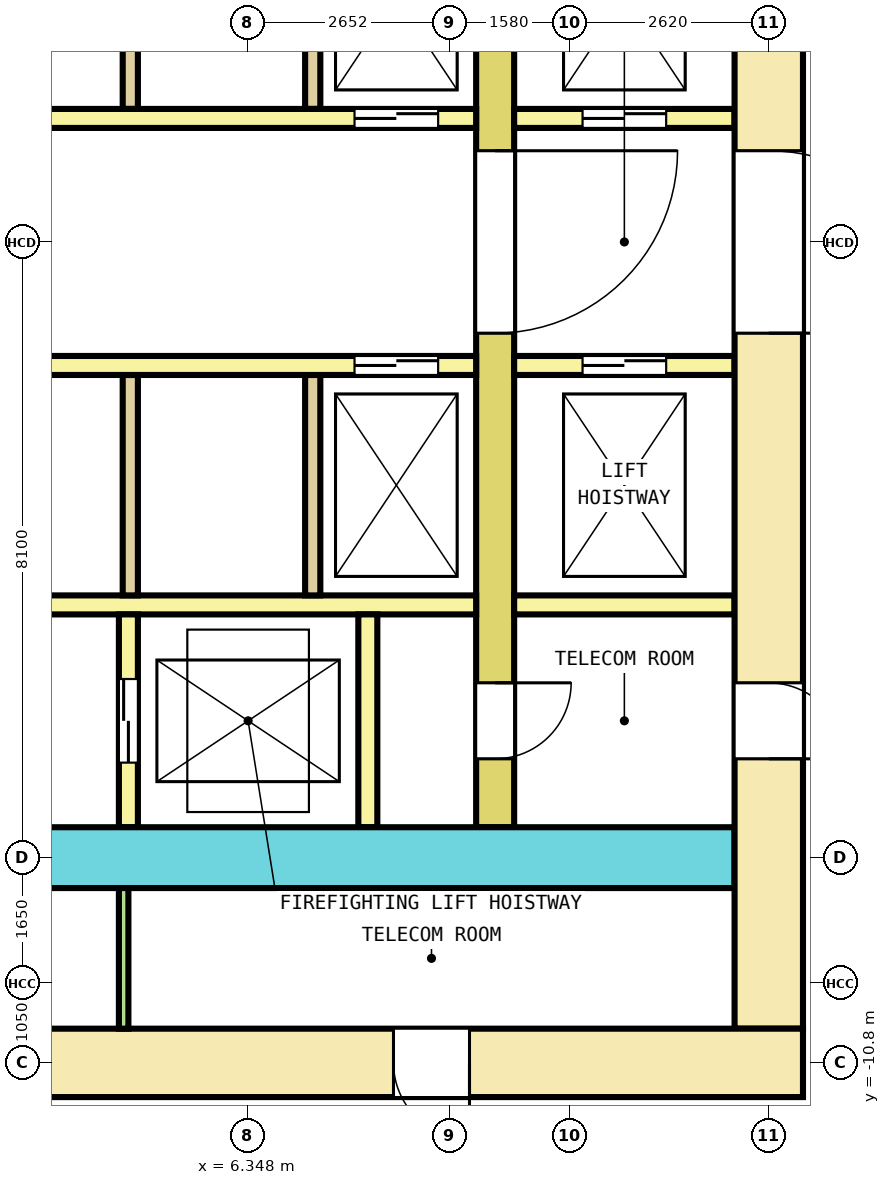
"""IFC4 building model, lengths in metres.
Left out: names, types, materials, properties, quantities, classifications, styles, units other than length and angle.
Written with IfcOpenShell. Run it as: python <this file> out.ifc"""

import sys

from ifc_helpers import new_model, si_unit, direction, frame, frame_2d, origin, place, context, subcontext, project, spatial, rectangle, extrude, element, fill, save


model = new_model("IFC4")
c1 = context("Model", 3, precision=1e-05, world=origin(), true_north=direction((0.0, 1.0)))
c2 = subcontext(c1, "Body", "Model", "MODEL_VIEW")
j1 = project(units=[si_unit("LENGTHUNIT", "METRE"), si_unit("PLANEANGLEUNIT", "RADIAN")], contexts=[c1])
p1 = place(None, origin())
s1 = spatial("IfcSite", under=j1, at=p1, CompositionType="ELEMENT")
p2 = place(p1, origin())
s2 = spatial("IfcBuilding", under=s1, at=p2, CompositionType="ELEMENT")
p3 = place(p2, frame((0.0, 0.0, 49.8)))
s3 = spatial("IfcBuildingStorey", under=s2, at=p3, CompositionType="ELEMENT", Elevation=49.8)
p4 = place(p3, frame((-13.65, -10.8, 0.0), z_axis=(0.0, 0.0, 1.0), x_axis=(1.0, 0.0, 0.0)))
e1 = element("IfcWall", 1, at=p4, inside=s3, PredefinedType="SHEAR", context=c2, shape_type="SweptSolid", body=[
    extrude(rectangle(XDim=27.3, YDim=0.9, at=frame_2d((13.65, 0.0))), origin(), (0.0, 0.0, 1.0), 4.1),
])
p5 = place(p4, frame((1.911, 0.0, 0.0)))
e2 = element("IfcOpeningElement", 2, at=p5, cuts=e1, PredefinedType="OPENING", context=c2, shape_type="SweptSolid", body=[
    extrude(rectangle(XDim=1.0, YDim=2.1, at=frame_2d((0.5, 1.05))), frame((0.0, 0.46, 0.0), z_axis=(0.0, -1.0, 0.0), x_axis=(1.0, 0.0, 0.0)), (0.0, 0.0, 1.0), 0.92),
])
p6 = place(p4, frame((5.027, 0.0, 0.0)))
e3 = element("IfcOpeningElement", 3, at=p6, cuts=e1, PredefinedType="OPENING", context=c2, shape_type="SweptSolid", body=[
    extrude(rectangle(XDim=1.0, YDim=2.1, at=frame_2d((0.5, 1.05))), frame((0.0, 0.46, 0.0), z_axis=(0.0, -1.0, 0.0), x_axis=(1.0, 0.0, 0.0)), (0.0, 0.0, 1.0), 0.92),
])
p7 = place(p4, frame((8.111, 0.0, 0.0)))
e4 = element("IfcOpeningElement", 4, at=p7, cuts=e1, PredefinedType="OPENING", context=c2, shape_type="SweptSolid", body=[
    extrude(rectangle(XDim=1.0, YDim=2.1, at=frame_2d((0.5, 1.05))), frame((0.0, 0.46, 0.0), z_axis=(0.0, -1.0, 0.0), x_axis=(1.0, 0.0, 0.0)), (0.0, 0.0, 1.0), 0.92),
])
p8 = place(p4, frame((11.195, 0.0, 0.0)))
e5 = element("IfcOpeningElement", 5, at=p8, cuts=e1, PredefinedType="OPENING", context=c2, shape_type="SweptSolid", body=[
    extrude(rectangle(XDim=1.0, YDim=2.1, at=frame_2d((0.5, 1.05))), frame((0.0, 0.46, 0.0), z_axis=(0.0, -1.0, 0.0), x_axis=(1.0, 0.0, 0.0)), (0.0, 0.0, 1.0), 0.92),
])
p9 = place(p4, frame((21.913, 0.0, 0.0)))
e6 = element("IfcOpeningElement", 6, at=p9, cuts=e1, PredefinedType="OPENING", context=c2, shape_type="SweptSolid", body=[
    extrude(rectangle(XDim=1.0, YDim=2.1, at=frame_2d((0.5, 1.05))), frame((0.0, 0.46, 0.0), z_axis=(0.0, -1.0, 0.0), x_axis=(1.0, 0.0, 0.0)), (0.0, 0.0, 1.0), 0.92),
])
p10 = place(p4, frame((15.2, 0.0, 0.0)))
e7 = element("IfcOpeningElement", 7, at=p10, cuts=e1, PredefinedType="OPENING", context=c2, shape_type="SweptSolid", body=[
    extrude(rectangle(XDim=1.2, YDim=2.1, at=frame_2d((0.6, 1.05))), frame((0.0, 0.46, 0.0), z_axis=(0.0, -1.0, 0.0), x_axis=(1.0, 0.0, 0.0)), (0.0, 0.0, 1.0), 0.92),
])
p11 = place(p3, frame((13.2, -10.35, 0.0), z_axis=(0.0, 0.0, 1.0), x_axis=(0.0, 1.0, 0.0)))
e8 = element("IfcWall", 8, at=p11, inside=s3, PredefinedType="SHEAR", context=c2, shape_type="SweptSolid", body=[
    extrude(rectangle(XDim=20.7, YDim=0.9, at=frame_2d((10.35, 0.0))), origin(), (0.0, 0.0, 1.0), 4.1),
])
p12 = place(p11, frame((9.15, 0.0, 0.0)))
e9 = element("IfcOpeningElement", 9, at=p12, cuts=e8, PredefinedType="OPENING", context=c2, shape_type="SweptSolid", body=[
    extrude(rectangle(XDim=2.4, YDim=2.1, at=frame_2d((1.2, 1.05))), frame((0.0, 0.46, 0.0), z_axis=(0.0, -1.0, 0.0), x_axis=(1.0, 0.0, 0.0)), (0.0, 0.0, 1.0), 0.92),
])
p13 = place(p11, frame((16.05, 0.0, 0.0)))
e10 = element("IfcOpeningElement", 10, at=p13, cuts=e8, PredefinedType="OPENING", context=c2, shape_type="SweptSolid", body=[
    extrude(rectangle(XDim=1.2, YDim=2.1, at=frame_2d((0.6, 1.05))), frame((0.0, 0.46, 0.0), z_axis=(0.0, -1.0, 0.0), x_axis=(1.0, 0.0, 0.0)), (0.0, 0.0, 1.0), 0.92),
])
p14 = place(p11, frame((3.55, 0.0, 0.0)))
e11 = element("IfcOpeningElement", 11, at=p14, cuts=e8, PredefinedType="OPENING", context=c2, shape_type="SweptSolid", body=[
    extrude(rectangle(XDim=1.0, YDim=2.1, at=frame_2d((0.5, 1.05))), frame((0.0, 0.46, 0.0), z_axis=(0.0, -1.0, 0.0), x_axis=(1.0, 0.0, 0.0)), (0.0, 0.0, 1.0), 0.92),
])
p15 = place(p3, frame((-12.75, -8.1, 0.0), z_axis=(0.0, 0.0, 1.0), x_axis=(1.0, 0.0, 0.0)))
e12 = element("IfcWall", 12, at=p15, inside=s3, PredefinedType="SHEAR", context=c2, shape_type="SweptSolid", body=[
    extrude(rectangle(XDim=25.5, YDim=0.8, at=frame_2d((12.75, 0.0))), origin(), (0.0, 0.0, 1.0), 4.1),
])
p16 = place(p15, frame((14.3, 0.0, 0.0)))
e13 = element("IfcOpeningElement", 13, at=p16, cuts=e12, PredefinedType="OPENING", context=c2, shape_type="SweptSolid", body=[
    extrude(rectangle(XDim=1.2, YDim=2.1, at=frame_2d((0.6, 1.05))), frame((0.0, 0.41, 0.0), z_axis=(0.0, -1.0, 0.0), x_axis=(1.0, 0.0, 0.0)), (0.0, 0.0, 1.0), 0.82),
])
p17 = place(p3, frame((9.6, -7.7, 0.0), z_axis=(0.0, 0.0, 1.0), x_axis=(0.0, 1.0, 0.0)))
e14 = element("IfcWall", 14, at=p17, inside=s3, PredefinedType="SHEAR", context=c2, shape_type="SweptSolid", body=[
    extrude(rectangle(XDim=15.4, YDim=0.5, at=frame_2d((7.7, 0.0))), origin(), (0.0, 0.0, 1.0), 4.1),
])
p18 = place(p17, frame((6.5, 0.0, 0.0)))
e15 = element("IfcOpeningElement", 15, at=p18, cuts=e14, PredefinedType="OPENING", context=c2, shape_type="SweptSolid", body=[
    extrude(rectangle(XDim=2.4, YDim=2.1, at=frame_2d((1.2, 1.05))), frame((0.0, 0.26, 0.0), z_axis=(0.0, -1.0, 0.0), x_axis=(1.0, 0.0, 0.0)), (0.0, 0.0, 1.0), 0.52),
])
p19 = place(p17, frame((13.4, 0.0, 0.0)))
e16 = element("IfcOpeningElement", 16, at=p19, cuts=e14, PredefinedType="OPENING", context=c2, shape_type="SweptSolid", body=[
    extrude(rectangle(XDim=1.2, YDim=2.1, at=frame_2d((0.6, 1.05))), frame((0.0, 0.26, 0.0), z_axis=(0.0, -1.0, 0.0), x_axis=(1.0, 0.0, 0.0)), (0.0, 0.0, 1.0), 0.52),
])
p20 = place(p17, frame((0.9, 0.0, 0.0)))
e17 = element("IfcOpeningElement", 17, at=p20, cuts=e14, PredefinedType="OPENING", context=c2, shape_type="SweptSolid", body=[
    extrude(rectangle(XDim=1.0, YDim=2.1, at=frame_2d((0.5, 1.05))), frame((0.0, 0.26, 0.0), z_axis=(0.0, -1.0, 0.0), x_axis=(1.0, 0.0, 0.0)), (0.0, 0.0, 1.0), 0.52),
])
p21 = place(p3, frame((-9.35, 1.625, 0.0), z_axis=(0.0, 0.0, 1.0), x_axis=(1.0, 0.0, 0.0)))
e18 = element("IfcWall", 18, at=p21, inside=s3, PredefinedType="SOLIDWALL", context=c2, shape_type="SweptSolid", body=[
    extrude(rectangle(XDim=18.7, YDim=0.25, at=frame_2d((9.35, 0.0))), origin(), (0.0, 0.0, 1.0), 4.1),
])
p22 = place(p21, frame((0.5, 0.0, 0.0)))
e19 = element("IfcOpeningElement", 19, at=p22, cuts=e18, PredefinedType="OPENING", context=c2, shape_type="SweptSolid", body=[
    extrude(rectangle(XDim=1.1, YDim=2.1, at=frame_2d((0.55, 1.05))), frame((0.0, 0.135, 0.0), z_axis=(0.0, -1.0, 0.0), x_axis=(1.0, 0.0, 0.0)), (0.0, 0.0, 1.0), 0.27),
])
p23 = place(p21, frame((17.1, 0.0, 0.0)))
e20 = element("IfcOpeningElement", 20, at=p23, cuts=e18, PredefinedType="OPENING", context=c2, shape_type="SweptSolid", body=[
    extrude(rectangle(XDim=1.1, YDim=2.1, at=frame_2d((0.55, 1.05))), frame((0.0, 0.135, 0.0), z_axis=(0.0, -1.0, 0.0), x_axis=(1.0, 0.0, 0.0)), (0.0, 0.0, 1.0), 0.27),
])
p24 = place(p3, frame((9.85, 1.625, 0.0), z_axis=(0.0, 0.0, 1.0), x_axis=(1.0, 0.0, 0.0)))
e21 = element("IfcWall", 21, at=p24, inside=s3, PredefinedType="SOLIDWALL", context=c2, shape_type="SweptSolid", body=[
    extrude(rectangle(XDim=2.9, YDim=0.25, at=frame_2d((1.45, 0.0))), origin(), (0.0, 0.0, 1.0), 4.1),
])
p25 = place(p24, frame((0.9, 0.0, 0.0)))
e22 = element("IfcOpeningElement", 22, at=p25, cuts=e21, PredefinedType="OPENING", context=c2, shape_type="SweptSolid", body=[
    extrude(rectangle(XDim=1.1, YDim=2.1, at=frame_2d((0.55, 1.05))), frame((0.0, 0.135, 0.0), z_axis=(0.0, -1.0, 0.0), x_axis=(1.0, 0.0, 0.0)), (0.0, 0.0, 1.0), 0.27),
])
for number, where, z_axis, x_axis in (
    (23, (4.8, 1.75, 0.0), (0.0, 0.0, 1.0), (0.0, 1.0, 0.0)),
    (24, (7.2, 1.75, 0.0), (0.0, 0.0, 1.0), (0.0, 1.0, 0.0)),
):
    element("IfcWall", number, at=place(p3, frame(where, z_axis=z_axis, x_axis=x_axis)), inside=s3, PredefinedType="SOLIDWALL", context=c2, shape_type="SweptSolid", body=[
        extrude(rectangle(XDim=2.9, YDim=0.2, at=frame_2d((1.45, 0.0))), origin(), (0.0, 0.0, 1.0), 4.1),
    ])
p26 = place(p3, frame((-9.35, -1.625, 0.0), z_axis=(0.0, 0.0, 1.0), x_axis=(1.0, 0.0, 0.0)))
e25 = element("IfcWall", 25, at=p26, inside=s3, PredefinedType="SOLIDWALL", context=c2, shape_type="SweptSolid", body=[
    extrude(rectangle(XDim=18.7, YDim=0.25, at=frame_2d((9.35, 0.0))), origin(), (0.0, 0.0, 1.0), 4.1),
])
p27 = place(p26, frame((0.5, 0.0, 0.0)))
e26 = element("IfcOpeningElement", 26, at=p27, cuts=e25, PredefinedType="OPENING", context=c2, shape_type="SweptSolid", body=[
    extrude(rectangle(XDim=1.1, YDim=2.1, at=frame_2d((0.55, 1.05))), frame((0.0, 0.135, 0.0), z_axis=(0.0, -1.0, 0.0), x_axis=(1.0, 0.0, 0.0)), (0.0, 0.0, 1.0), 0.27),
])
p28 = place(p26, frame((17.1, 0.0, 0.0)))
e27 = element("IfcOpeningElement", 27, at=p28, cuts=e25, PredefinedType="OPENING", context=c2, shape_type="SweptSolid", body=[
    extrude(rectangle(XDim=1.1, YDim=2.1, at=frame_2d((0.55, 1.05))), frame((0.0, 0.135, 0.0), z_axis=(0.0, -1.0, 0.0), x_axis=(1.0, 0.0, 0.0)), (0.0, 0.0, 1.0), 0.27),
])
p29 = place(p3, frame((9.85, -1.625, 0.0), z_axis=(0.0, 0.0, 1.0), x_axis=(1.0, 0.0, 0.0)))
e28 = element("IfcWall", 28, at=p29, inside=s3, PredefinedType="SOLIDWALL", context=c2, shape_type="SweptSolid", body=[
    extrude(rectangle(XDim=2.9, YDim=0.25, at=frame_2d((1.45, 0.0))), origin(), (0.0, 0.0, 1.0), 4.1),
])
p30 = place(p29, frame((0.9, 0.0, 0.0)))
e29 = element("IfcOpeningElement", 29, at=p30, cuts=e28, PredefinedType="OPENING", context=c2, shape_type="SweptSolid", body=[
    extrude(rectangle(XDim=1.1, YDim=2.1, at=frame_2d((0.55, 1.05))), frame((0.0, 0.135, 0.0), z_axis=(0.0, -1.0, 0.0), x_axis=(1.0, 0.0, 0.0)), (0.0, 0.0, 1.0), 0.27),
])
p31 = place(p3, frame((-9.35, -4.775, 0.0), z_axis=(0.0, 0.0, 1.0), x_axis=(1.0, 0.0, 0.0)))
e30 = element("IfcWall", 30, at=p31, inside=s3, PredefinedType="SOLIDWALL", context=c2, shape_type="SweptSolid", body=[
    extrude(rectangle(XDim=18.7, YDim=0.25, at=frame_2d((9.35, 0.0))), origin(), (0.0, 0.0, 1.0), 4.1),
])
p32 = place(p3, frame((9.85, -4.775, 0.0), z_axis=(0.0, 0.0, 1.0), x_axis=(1.0, 0.0, 0.0)))
e31 = element("IfcWall", 31, at=p32, inside=s3, PredefinedType="SOLIDWALL", context=c2, shape_type="SweptSolid", body=[
    extrude(rectangle(XDim=2.9, YDim=0.25, at=frame_2d((1.45, 0.0))), origin(), (0.0, 0.0, 1.0), 4.1),
])
for number, where, z_axis, x_axis in (
    (32, (4.8, -4.65, 0.0), (0.0, 0.0, 1.0), (0.0, 1.0, 0.0)),
    (33, (7.2, -4.65, 0.0), (0.0, 0.0, 1.0), (0.0, 1.0, 0.0)),
):
    element("IfcWall", number, at=place(p3, frame(where, z_axis=z_axis, x_axis=x_axis)), inside=s3, PredefinedType="SOLIDWALL", context=c2, shape_type="SweptSolid", body=[
        extrude(rectangle(XDim=2.9, YDim=0.2, at=frame_2d((1.45, 0.0))), origin(), (0.0, 0.0, 1.0), 4.1),
    ])
p33 = place(p3, frame((4.775, -7.7, 0.0), z_axis=(0.0, 0.0, 1.0), x_axis=(0.0, 1.0, 0.0)))
e34 = element("IfcWall", 34, at=p33, inside=s3, PredefinedType="SOLIDWALL", context=c2, shape_type="SweptSolid", body=[
    extrude(rectangle(XDim=2.8, YDim=0.25, at=frame_2d((1.4, 0.0))), origin(), (0.0, 0.0, 1.0), 4.1),
])
p34 = place(p33, frame((0.85, 0.0, 0.0)))
e35 = element("IfcOpeningElement", 35, at=p34, cuts=e34, PredefinedType="OPENING", context=c2, shape_type="SweptSolid", body=[
    extrude(rectangle(XDim=1.1, YDim=2.1, at=frame_2d((0.55, 1.05))), frame((0.0, 0.135, 0.0), z_axis=(0.0, -1.0, 0.0), x_axis=(1.0, 0.0, 0.0)), (0.0, 0.0, 1.0), 0.27),
])
p35 = place(p3, frame((7.925, -7.7, 0.0), z_axis=(0.0, 0.0, 1.0), x_axis=(0.0, 1.0, 0.0)))
e36 = element("IfcWall", 36, at=p35, inside=s3, PredefinedType="SOLIDWALL", context=c2, shape_type="SweptSolid", body=[
    extrude(rectangle(XDim=2.8, YDim=0.25, at=frame_2d((1.4, 0.0))), origin(), (0.0, 0.0, 1.0), 4.1),
])
p36 = place(p3, frame((4.712, -10.35, 0.0), z_axis=(0.0, 0.0, 1.0), x_axis=(0.0, 1.0, 0.0)))
e37 = element("IfcWall", 37, at=p36, inside=s3, PredefinedType="PARTITIONING", context=c2, shape_type="SweptSolid", body=[
    extrude(rectangle(XDim=1.85, YDim=0.125, at=frame_2d((0.925, 0.0))), origin(), (0.0, 0.0, 1.0), 4.1),
])
p37 = place(p23, origin())
e38 = element("IfcDoor", 38, at=p37, inside=s3, OperationType="DOUBLE_DOOR_SLIDING", PredefinedType="DOOR", context=c2, shape_type="SweptSolid", body=[
    extrude(rectangle(XDim=1.1, YDim=2.1, at=frame_2d((0.55, 1.05))), frame((0.0, 0.075, 0.0), z_axis=(0.0, -1.0, 0.0), x_axis=(1.0, 0.0, 0.0)), (0.0, 0.0, 1.0), 0.15),
])
fill(e20, e38)
p38 = place(p25, origin())
e39 = element("IfcDoor", 39, at=p38, inside=s3, OperationType="DOUBLE_DOOR_SLIDING", PredefinedType="DOOR", context=c2, shape_type="SweptSolid", body=[
    extrude(rectangle(XDim=1.1, YDim=2.1, at=frame_2d((0.55, 1.05))), frame((0.0, 0.075, 0.0), z_axis=(0.0, -1.0, 0.0), x_axis=(1.0, 0.0, 0.0)), (0.0, 0.0, 1.0), 0.15),
])
fill(e22, e39)
p39 = place(p28, origin())
e40 = element("IfcDoor", 40, at=p39, inside=s3, OperationType="DOUBLE_DOOR_SLIDING", PredefinedType="DOOR", context=c2, shape_type="SweptSolid", body=[
    extrude(rectangle(XDim=1.1, YDim=2.1, at=frame_2d((0.55, 1.05))), frame((0.0, 0.075, 0.0), z_axis=(0.0, -1.0, 0.0), x_axis=(1.0, 0.0, 0.0)), (0.0, 0.0, 1.0), 0.15),
])
fill(e27, e40)
p40 = place(p30, origin())
e41 = element("IfcDoor", 41, at=p40, inside=s3, OperationType="DOUBLE_DOOR_SLIDING", PredefinedType="DOOR", context=c2, shape_type="SweptSolid", body=[
    extrude(rectangle(XDim=1.1, YDim=2.1, at=frame_2d((0.55, 1.05))), frame((0.0, 0.075, 0.0), z_axis=(0.0, -1.0, 0.0), x_axis=(1.0, 0.0, 0.0)), (0.0, 0.0, 1.0), 0.15),
])
fill(e29, e41)
p41 = place(p34, origin())
e42 = element("IfcDoor", 42, at=p41, inside=s3, OperationType="DOUBLE_DOOR_SLIDING", PredefinedType="DOOR", context=c2, shape_type="SweptSolid", body=[
    extrude(rectangle(XDim=1.1, YDim=2.1, at=frame_2d((0.55, 1.05))), frame((0.0, 0.075, 0.0), z_axis=(0.0, -1.0, 0.0), x_axis=(1.0, 0.0, 0.0)), (0.0, 0.0, 1.0), 0.15),
])
fill(e35, e42)
p42 = place(p18, origin())
e43 = element("IfcDoor", 43, at=p42, inside=s3, OperationType="DOUBLE_DOOR_SINGLE_SWING", PredefinedType="DOOR", context=c2, shape_type="SweptSolid", body=[
    extrude(rectangle(XDim=2.4, YDim=2.1, at=frame_2d((1.2, 1.05))), frame((0.0, 0.2, 0.0), z_axis=(0.0, -1.0, 0.0), x_axis=(1.0, 0.0, 0.0)), (0.0, 0.0, 1.0), 0.4),
])
fill(e15, e43)
p43 = place(p12, origin())
e44 = element("IfcDoor", 44, at=p43, inside=s3, OperationType="DOUBLE_DOOR_SINGLE_SWING", PredefinedType="DOOR", context=c2, shape_type="SweptSolid", body=[
    extrude(rectangle(XDim=2.4, YDim=2.1, at=frame_2d((1.2, 1.05))), frame((0.0, 0.3, 0.0), z_axis=(0.0, -1.0, 0.0), x_axis=(1.0, 0.0, 0.0)), (0.0, 0.0, 1.0), 0.6),
])
fill(e9, e44)
p44 = place(p20, origin())
e45 = element("IfcDoor", 45, at=p44, inside=s3, OperationType="SINGLE_SWING_RIGHT", PredefinedType="DOOR", context=c2, shape_type="SweptSolid", body=[
    extrude(rectangle(XDim=1.0, YDim=2.1, at=frame_2d((0.5, 1.05))), frame((0.0, 0.2, 0.0), z_axis=(0.0, -1.0, 0.0), x_axis=(1.0, 0.0, 0.0)), (0.0, 0.0, 1.0), 0.4),
])
fill(e17, e45)
p45 = place(p14, origin())
e46 = element("IfcDoor", 46, at=p45, inside=s3, OperationType="SINGLE_SWING_LEFT", PredefinedType="DOOR", context=c2, shape_type="SweptSolid", body=[
    extrude(rectangle(XDim=1.0, YDim=2.1, at=frame_2d((0.5, 1.05))), frame((0.0, 0.3, 0.0), z_axis=(0.0, -1.0, 0.0), x_axis=(1.0, 0.0, 0.0)), (0.0, 0.0, 1.0), 0.6),
])
fill(e11, e46)
p46 = place(p9, origin())
e47 = element("IfcDoor", 47, at=p46, inside=s3, OperationType="SINGLE_SWING_LEFT", PredefinedType="DOOR", context=c2, shape_type="SweptSolid", body=[
    extrude(rectangle(XDim=1.0, YDim=2.1, at=frame_2d((0.5, 1.05))), frame((0.0, 0.3, 0.0), z_axis=(0.0, -1.0, 0.0), x_axis=(1.0, 0.0, 0.0)), (0.0, 0.0, 1.0), 0.6),
])
fill(e6, e47)
save(model, sys.argv[1])
